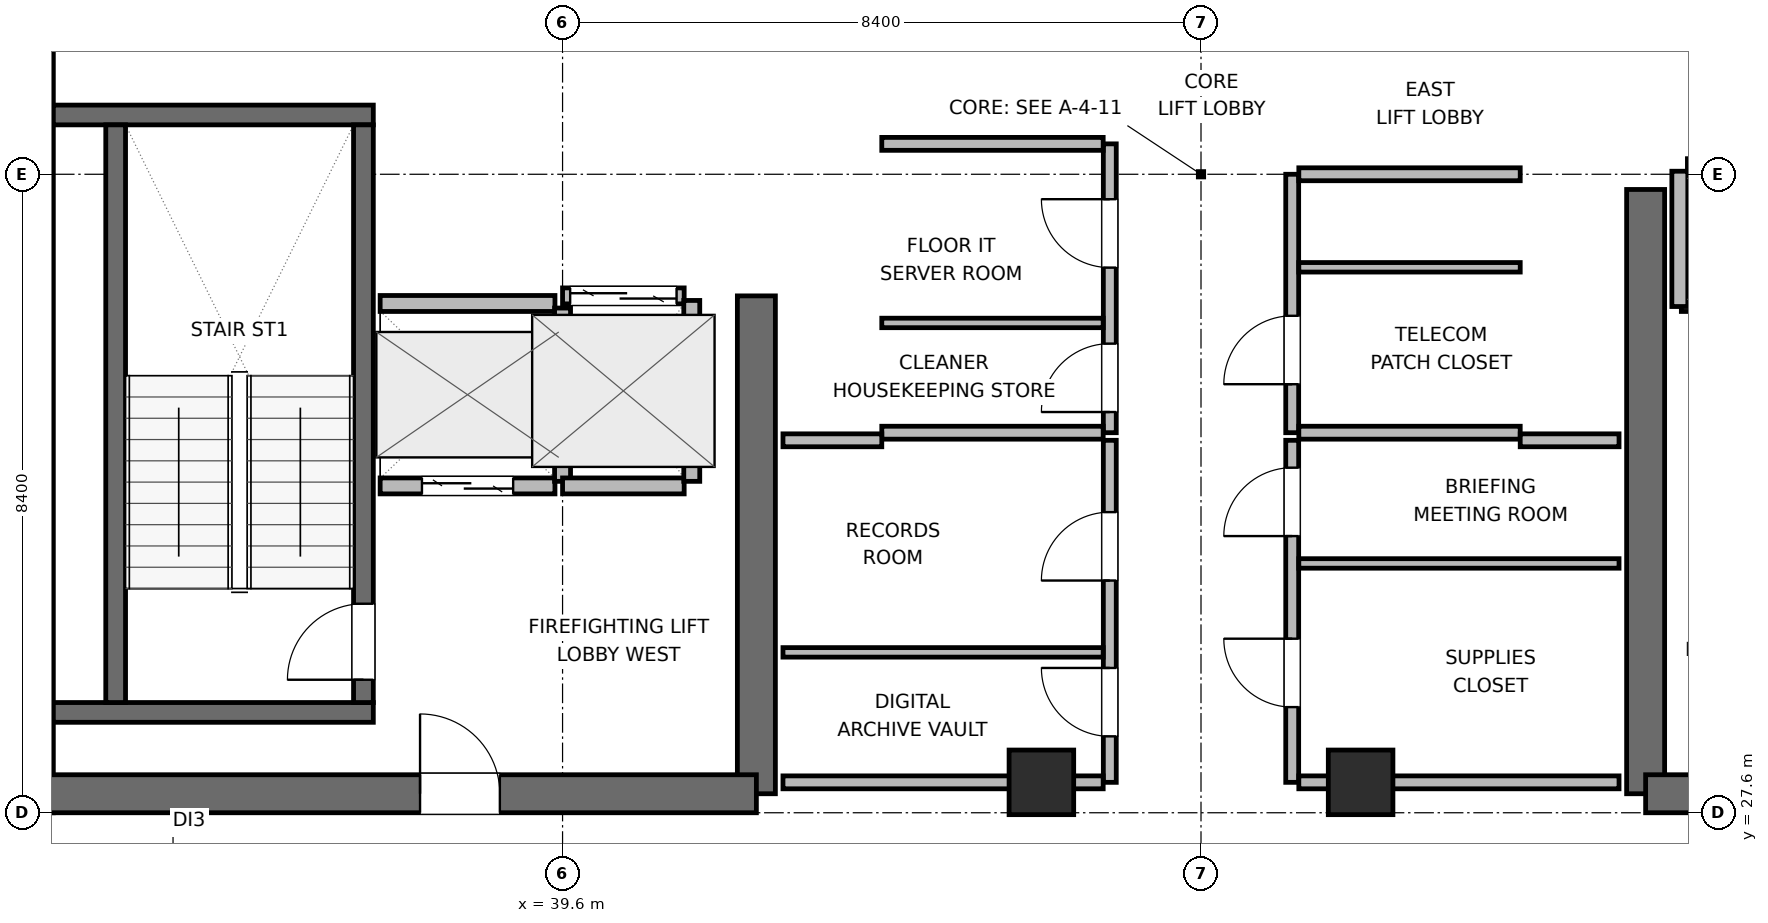
"""IFC4 building model, lengths in metres.
Left out: names, types, materials, properties, quantities, classifications, styles, units other than length and angle.
Written with IfcOpenShell. Run it as: python <this file> out.ifc"""

import sys

from ifc_helpers import new_model, si_unit, direction, frame, frame_2d, origin, origin_2d, place, context, subcontext, project, spatial, rectangle, extrude, element, fill, save


model = new_model("IFC4")
c1 = context("Model", 3, precision=1e-05, world=origin(), true_north=direction((0.0, 1.0)))
c2 = subcontext(c1, "Body", "Model", "MODEL_VIEW")
j1 = project(units=[si_unit("LENGTHUNIT", "METRE"), si_unit("PLANEANGLEUNIT", "RADIAN")], contexts=[c1])
p1 = place(None, origin())
s1 = spatial("IfcSite", under=j1, at=p1, CompositionType="ELEMENT")
p2 = place(p1, origin())
s2 = spatial("IfcBuilding", under=s1, at=p2, CompositionType="ELEMENT")
p3 = place(p2, frame((0.0, 0.0, 325.8)))
s3 = spatial("IfcBuildingStorey", under=s2, at=p3, CompositionType="ELEMENT", Elevation=325.8)
p4 = place(p3, frame((32.65, 27.6, 0.0), z_axis=(0.0, 0.0, 1.0), x_axis=(0.0, 1.0, 0.0)))
e1 = element("IfcWall", 1, at=p4, inside=s3, PredefinedType="SHEAR", context=c2, shape_type="SweptSolid", body=[
    extrude(rectangle(XDim=16.8, YDim=0.5, at=frame_2d((8.4, 0.0))), origin(), (0.0, 0.0, 1.0), 3.9),
])
p5 = place(p3, frame((42.15, 27.85, 0.0), z_axis=(0.0, 0.0, 1.0), x_axis=(0.0, 1.0, 0.0)))
e2 = element("IfcWall", 2, at=p5, inside=s3, PredefinedType="SHEAR", context=c2, shape_type="SweptSolid", body=[
    extrude(rectangle(XDim=6.55, YDim=0.5, at=frame_2d((3.275, 0.0))), origin(), (0.0, 0.0, 1.0), 3.9),
])
p6 = place(p3, frame((32.65, 27.85, 0.0), z_axis=(0.0, 0.0, 1.0), x_axis=(1.0, 0.0, 0.0)))
e3 = element("IfcWall", 3, at=p6, inside=s3, PredefinedType="SHEAR", context=c2, shape_type="SweptSolid", body=[
    extrude(rectangle(XDim=9.5, YDim=0.5, at=frame_2d((4.75, 0.0))), origin(), (0.0, 0.0, 1.0), 3.9),
])
p7 = place(p6, frame((5.075, 0.0, 0.0)))
e4 = element("IfcOpeningElement", 4, at=p7, cuts=e3, PredefinedType="OPENING", context=c2, shape_type="SweptSolid", body=[
    extrude(rectangle(XDim=1.05, YDim=2.04, at=frame_2d((0.525, 1.02))), frame((0.0, 0.26, 0.0), z_axis=(0.0, -1.0, 0.0), x_axis=(1.0, 0.0, 0.0)), (0.0, 0.0, 1.0), 0.52),
])
p8 = place(p3, frame((53.85, 27.85, 0.0), z_axis=(0.0, 0.0, 1.0), x_axis=(0.0, 1.0, 0.0)))
e5 = element("IfcWall", 5, at=p8, inside=s3, PredefinedType="SHEAR", context=c2, shape_type="SweptSolid", body=[
    extrude(rectangle(XDim=7.95, YDim=0.5, at=frame_2d((3.975, 0.0))), origin(), (0.0, 0.0, 1.0), 3.9),
])
p9 = place(p3, frame((53.85, 27.85, 0.0), z_axis=(0.0, 0.0, 1.0), x_axis=(1.0, 0.0, 0.0)))
e6 = element("IfcWall", 6, at=p9, inside=s3, PredefinedType="SHEAR", context=c2, shape_type="SweptSolid", body=[
    extrude(rectangle(XDim=9.5, YDim=0.5, at=frame_2d((4.75, 0.0))), origin(), (0.0, 0.0, 1.0), 3.9),
])
p10 = place(p9, frame((4.025, 0.0, 0.0)))
e7 = element("IfcOpeningElement", 7, at=p10, cuts=e6, PredefinedType="OPENING", context=c2, shape_type="SweptSolid", body=[
    extrude(rectangle(XDim=1.05, YDim=2.04, at=frame_2d((0.525, 1.02))), frame((0.0, 0.26, 0.0), z_axis=(0.0, -1.0, 0.0), x_axis=(1.0, 0.0, 0.0)), (0.0, 0.0, 1.0), 0.52),
])
for number, where, z_axis, x_axis in (
    (8, (32.9, 28.92, 0.0), (0.0, 0.0, 1.0), (1.0, 0.0, 0.0)),
    (9, (32.9, 36.78, 0.0), (0.0, 0.0, 1.0), (1.0, 0.0, 0.0)),
):
    element("IfcWall", number, at=place(p3, frame(where, z_axis=z_axis, x_axis=x_axis)), inside=s3, PredefinedType="SHEAR", context=c2, shape_type="SweptSolid", body=[
        extrude(rectangle(XDim=4.21, YDim=0.26, at=frame_2d((2.105, 0.0))), origin(), (0.0, 0.0, 1.0), 3.9),
    ])
p11 = place(p3, frame((33.72, 29.05, 0.0), z_axis=(0.0, 0.0, 1.0), x_axis=(0.0, 1.0, 0.0)))
e10 = element("IfcWall", 10, at=p11, inside=s3, PredefinedType="SHEAR", context=c2, shape_type="SweptSolid", body=[
    extrude(rectangle(XDim=7.6, YDim=0.26, at=frame_2d((3.8, 0.0))), origin(), (0.0, 0.0, 1.0), 3.9),
])
p12 = place(p3, frame((36.98, 29.05, 0.0), z_axis=(0.0, 0.0, 1.0), x_axis=(0.0, 1.0, 0.0)))
e11 = element("IfcWall", 11, at=p12, inside=s3, PredefinedType="SHEAR", context=c2, shape_type="SweptSolid", body=[
    extrude(rectangle(XDim=7.6, YDim=0.26, at=frame_2d((3.8, 0.0))), origin(), (0.0, 0.0, 1.0), 3.9),
])
p13 = place(p12, frame((0.3, 0.0, 0.0)))
e12 = element("IfcOpeningElement", 12, at=p13, cuts=e11, PredefinedType="OPENING", context=c2, shape_type="SweptSolid", body=[
    extrude(rectangle(XDim=1.0, YDim=2.04, at=frame_2d((0.5, 1.02))), frame((0.0, 0.14, 0.0), z_axis=(0.0, -1.0, 0.0), x_axis=(1.0, 0.0, 0.0)), (0.0, 0.0, 1.0), 0.28),
])
for number, where, z_axis, x_axis in (
    (13, (45.9, 28.0, 0.0), (0.0, 0.0, 1.0), (1.0, 0.0, 0.0)),
    (14, (50.1, 28.0, 0.0), (0.0, 0.0, 1.0), (1.0, 0.0, 0.0)),
):
    element("IfcColumn", number, at=place(p3, frame(where, z_axis=z_axis, x_axis=x_axis)), inside=s3, PredefinedType="COLUMN", context=c2, shape_type="SweptSolid", body=[
        extrude(rectangle(XDim=0.85, YDim=0.85, at=origin_2d()), origin(), (0.0, 0.0, 1.0), 3.9),
    ])
p14 = place(p3, frame((37.2, 31.9, 0.0), z_axis=(0.0, 0.0, 1.0), x_axis=(1.0, 0.0, 0.0)))
e15 = element("IfcWall", 15, at=p14, inside=s3, PredefinedType="PARTITIONING", context=c2, shape_type="SweptSolid", body=[
    extrude(rectangle(XDim=2.3, YDim=0.21, at=frame_2d((1.15, 0.0))), origin(), (0.0, 0.0, 1.0), 3.68),
])
p15 = place(p14, frame((0.55, 0.0, 0.0)))
e16 = element("IfcOpeningElement", 16, at=p15, cuts=e15, PredefinedType="OPENING", context=c2, shape_type="SweptSolid", body=[
    extrude(rectangle(XDim=1.2, YDim=2.04, at=frame_2d((0.6, 1.02))), frame((0.0, 0.115, 0.0), z_axis=(0.0, -1.0, 0.0), x_axis=(1.0, 0.0, 0.0)), (0.0, 0.0, 1.0), 0.23),
])
p16 = place(p3, frame((37.2, 34.3, 0.0), z_axis=(0.0, 0.0, 1.0), x_axis=(1.0, 0.0, 0.0)))
e17 = element("IfcWall", 17, at=p16, inside=s3, PredefinedType="PARTITIONING", context=c2, shape_type="SweptSolid", body=[
    extrude(rectangle(XDim=2.3, YDim=0.21, at=frame_2d((1.15, 0.0))), origin(), (0.0, 0.0, 1.0), 3.68),
])
p17 = place(p3, frame((39.6, 31.96, 0.0), z_axis=(0.0, 0.0, 1.0), x_axis=(0.0, 1.0, 0.0)))
e18 = element("IfcWall", 18, at=p17, inside=s3, PredefinedType="PARTITIONING", context=c2, shape_type="SweptSolid", body=[
    extrude(rectangle(XDim=2.28, YDim=0.21, at=frame_2d((1.14, 0.0))), origin(), (0.0, 0.0, 1.0), 3.68),
])
p18 = place(p3, frame((54.32, 34.3, 0.0), z_axis=(0.0, 0.0, 1.0), x_axis=(1.0, 0.0, 0.0)))
e19 = element("IfcWall", 19, at=p18, inside=s3, PredefinedType="PARTITIONING", context=c2, shape_type="SweptSolid", body=[
    extrude(rectangle(XDim=3.48, YDim=0.21, at=frame_2d((1.74, 0.0))), origin(), (0.0, 0.0, 1.0), 3.68),
])
p19 = place(p3, frame((39.6, 34.4, 0.0), z_axis=(0.0, 0.0, 1.0), x_axis=(1.0, 0.0, 0.0)))
e20 = element("IfcWall", 20, at=p19, inside=s3, PredefinedType="PARTITIONING", context=c2, shape_type="SweptSolid", body=[
    extrude(rectangle(XDim=1.6, YDim=0.21, at=frame_2d((0.8, 0.0))), origin(), (0.0, 0.0, 1.0), 3.68),
])
p20 = place(p19, frame((0.1, 0.0, 0.0)))
e21 = element("IfcOpeningElement", 21, at=p20, cuts=e20, PredefinedType="OPENING", context=c2, shape_type="SweptSolid", body=[
    extrude(rectangle(XDim=1.4, YDim=2.06, at=frame_2d((0.7, 1.03))), frame((0.0, 0.115, 0.0), z_axis=(0.0, -1.0, 0.0), x_axis=(1.0, 0.0, 0.0)), (0.0, 0.0, 1.0), 0.23),
])
p21 = place(p3, frame((39.6, 31.9, 0.0), z_axis=(0.0, 0.0, 1.0), x_axis=(1.0, 0.0, 0.0)))
e22 = element("IfcWall", 22, at=p21, inside=s3, PredefinedType="PARTITIONING", context=c2, shape_type="SweptSolid", body=[
    extrude(rectangle(XDim=1.6, YDim=0.21, at=frame_2d((0.8, 0.0))), origin(), (0.0, 0.0, 1.0), 3.68),
])
p22 = place(p3, frame((41.3, 31.96, 0.0), z_axis=(0.0, 0.0, 1.0), x_axis=(0.0, 1.0, 0.0)))
e23 = element("IfcWall", 23, at=p22, inside=s3, PredefinedType="PARTITIONING", context=c2, shape_type="SweptSolid", body=[
    extrude(rectangle(XDim=2.38, YDim=0.21, at=frame_2d((1.19, 0.0))), origin(), (0.0, 0.0, 1.0), 3.68),
])
p23 = place(p3, frame((54.4, 36.1, 0.0), z_axis=(0.0, 0.0, 1.0), x_axis=(1.0, 0.0, 0.0)))
e24 = element("IfcWall", 24, at=p23, inside=s3, PredefinedType="PARTITIONING", context=c2, shape_type="SweptSolid", body=[
    extrude(rectangle(XDim=2.1, YDim=0.21, at=frame_2d((1.05, 0.0))), origin(), (0.0, 0.0, 1.0), 3.68),
])
p24 = place(p23, frame((0.5, 0.0, 0.0)))
e25 = element("IfcOpeningElement", 25, at=p24, cuts=e24, PredefinedType="OPENING", context=c2, shape_type="SweptSolid", body=[
    extrude(rectangle(XDim=1.1, YDim=2.04, at=frame_2d((0.55, 1.02))), frame((0.0, 0.115, 0.0), z_axis=(0.0, -1.0, 0.0), x_axis=(1.0, 0.0, 0.0)), (0.0, 0.0, 1.0), 0.23),
])
p25 = place(p3, frame((54.3, 34.26, 0.0), z_axis=(0.0, 0.0, 1.0), x_axis=(0.0, 1.0, 0.0)))
e26 = element("IfcWall", 26, at=p25, inside=s3, PredefinedType="PARTITIONING", context=c2, shape_type="SweptSolid", body=[
    extrude(rectangle(XDim=1.78, YDim=0.21, at=frame_2d((0.89, 0.0))), origin(), (0.0, 0.0, 1.0), 3.68),
])
p26 = place(p3, frame((46.8, 32.6, 0.0), z_axis=(0.0, 0.0, 1.0), x_axis=(0.0, 1.0, 0.0)))
e27 = element("IfcWall", 27, at=p26, inside=s3, PredefinedType="PARTITIONING", context=c2, shape_type="SweptSolid", body=[
    extrude(rectangle(XDim=3.8, YDim=0.17, at=frame_2d((1.9, 0.0))), origin(), (0.0, 0.0, 1.0), 3.68),
])
p27 = place(p26, frame((0.272, 0.0, 0.0)))
e28 = element("IfcOpeningElement", 28, at=p27, cuts=e27, PredefinedType="OPENING", context=c2, shape_type="SweptSolid", body=[
    extrude(rectangle(XDim=0.9, YDim=2.02, at=frame_2d((0.45, 1.01))), frame((0.0, 0.095, 0.0), z_axis=(0.0, -1.0, 0.0), x_axis=(1.0, 0.0, 0.0)), (0.0, 0.0, 1.0), 0.19),
])
p28 = place(p26, frame((2.172, 0.0, 0.0)))
e29 = element("IfcOpeningElement", 29, at=p28, cuts=e27, PredefinedType="OPENING", context=c2, shape_type="SweptSolid", body=[
    extrude(rectangle(XDim=0.9, YDim=2.02, at=frame_2d((0.45, 1.01))), frame((0.0, 0.095, 0.0), z_axis=(0.0, -1.0, 0.0), x_axis=(1.0, 0.0, 0.0)), (0.0, 0.0, 1.0), 0.19),
])
for number, where, z_axis, x_axis in (
    (30, (43.8, 32.6, 0.0), (0.0, 0.0, 1.0), (1.0, 0.0, 0.0)),
    (31, (43.8, 36.4, 0.0), (0.0, 0.0, 1.0), (1.0, 0.0, 0.0)),
):
    element("IfcWall", number, at=place(p3, frame(where, z_axis=z_axis, x_axis=x_axis)), inside=s3, PredefinedType="PARTITIONING", context=c2, shape_type="SweptSolid", body=[
        extrude(rectangle(XDim=2.913, YDim=0.17, at=frame_2d((1.457, 0.0))), origin(), (0.0, 0.0, 1.0), 3.68),
    ])
p29 = place(p3, frame((43.8, 34.044, 0.0), z_axis=(0.0, 0.0, 1.0), x_axis=(1.0, 0.0, 0.0)))
e32 = element("IfcWall", 32, at=p29, inside=s3, PredefinedType="PARTITIONING", context=c2, shape_type="SweptSolid", body=[
    extrude(rectangle(XDim=2.913, YDim=0.125, at=frame_2d((1.457, 0.0))), origin(), (0.0, 0.0, 1.0), 3.68),
])
p30 = place(p3, frame((49.2, 32.6, 0.0), z_axis=(0.0, 0.0, 1.0), x_axis=(0.0, 1.0, 0.0)))
e33 = element("IfcWall", 33, at=p30, inside=s3, PredefinedType="PARTITIONING", context=c2, shape_type="SweptSolid", body=[
    extrude(rectangle(XDim=3.4, YDim=0.17, at=frame_2d((1.7, 0.0))), origin(), (0.0, 0.0, 1.0), 3.68),
])
p31 = place(p30, frame((0.638, 0.0, 0.0)))
e34 = element("IfcOpeningElement", 34, at=p31, cuts=e33, PredefinedType="OPENING", context=c2, shape_type="SweptSolid", body=[
    extrude(rectangle(XDim=0.9, YDim=2.02, at=frame_2d((0.45, 1.01))), frame((0.0, 0.095, 0.0), z_axis=(0.0, -1.0, 0.0), x_axis=(1.0, 0.0, 0.0)), (0.0, 0.0, 1.0), 0.19),
])
for number, where, z_axis, x_axis in (
    (35, (49.287, 32.6, 0.0), (0.0, 0.0, 1.0), (1.0, 0.0, 0.0)),
    (36, (49.287, 36.0, 0.0), (0.0, 0.0, 1.0), (1.0, 0.0, 0.0)),
):
    element("IfcWall", number, at=place(p3, frame(where, z_axis=z_axis, x_axis=x_axis)), inside=s3, PredefinedType="PARTITIONING", context=c2, shape_type="SweptSolid", body=[
        extrude(rectangle(XDim=2.913, YDim=0.17, at=frame_2d((1.457, 0.0))), origin(), (0.0, 0.0, 1.0), 3.68),
    ])
p32 = place(p3, frame((49.287, 34.776, 0.0), z_axis=(0.0, 0.0, 1.0), x_axis=(1.0, 0.0, 0.0)))
e37 = element("IfcWall", 37, at=p32, inside=s3, PredefinedType="PARTITIONING", context=c2, shape_type="SweptSolid", body=[
    extrude(rectangle(XDim=2.913, YDim=0.125, at=frame_2d((1.457, 0.0))), origin(), (0.0, 0.0, 1.0), 3.68),
])
p33 = place(p3, frame((46.8, 28.0, 0.0), z_axis=(0.0, 0.0, 1.0), x_axis=(0.0, 1.0, 0.0)))
e38 = element("IfcWall", 38, at=p33, inside=s3, PredefinedType="PARTITIONING", context=c2, shape_type="SweptSolid", body=[
    extrude(rectangle(XDim=4.5, YDim=0.17, at=frame_2d((2.25, 0.0))), origin(), (0.0, 0.0, 1.0), 3.68),
])
p34 = place(p33, frame((0.605, 0.0, 0.0)))
e39 = element("IfcOpeningElement", 39, at=p34, cuts=e38, PredefinedType="OPENING", context=c2, shape_type="SweptSolid", body=[
    extrude(rectangle(XDim=0.9, YDim=2.02, at=frame_2d((0.45, 1.01))), frame((0.0, 0.095, 0.0), z_axis=(0.0, -1.0, 0.0), x_axis=(1.0, 0.0, 0.0)), (0.0, 0.0, 1.0), 0.19),
])
p35 = place(p33, frame((2.655, 0.0, 0.0)))
e40 = element("IfcOpeningElement", 40, at=p35, cuts=e38, PredefinedType="OPENING", context=c2, shape_type="SweptSolid", body=[
    extrude(rectangle(XDim=0.9, YDim=2.02, at=frame_2d((0.45, 1.01))), frame((0.0, 0.095, 0.0), z_axis=(0.0, -1.0, 0.0), x_axis=(1.0, 0.0, 0.0)), (0.0, 0.0, 1.0), 0.19),
])
p36 = place(p3, frame((42.5, 28.0, 0.0), z_axis=(0.0, 0.0, 1.0), x_axis=(1.0, 0.0, 0.0)))
e41 = element("IfcWall", 41, at=p36, inside=s3, PredefinedType="PARTITIONING", context=c2, shape_type="SweptSolid", body=[
    extrude(rectangle(XDim=4.213, YDim=0.17, at=frame_2d((2.106, 0.0))), origin(), (0.0, 0.0, 1.0), 2.765),
])
p37 = place(p3, frame((42.5, 32.5, 0.0), z_axis=(0.0, 0.0, 1.0), x_axis=(1.0, 0.0, 0.0)))
e42 = element("IfcWall", 42, at=p37, inside=s3, PredefinedType="PARTITIONING", context=c2, shape_type="SweptSolid", body=[
    extrude(rectangle(XDim=1.3, YDim=0.17, at=frame_2d((0.65, 0.0))), origin(), (0.0, 0.0, 1.0), 3.68),
])
p38 = place(p3, frame((42.5, 29.71, 0.0), z_axis=(0.0, 0.0, 1.0), x_axis=(1.0, 0.0, 0.0)))
e43 = element("IfcWall", 43, at=p38, inside=s3, PredefinedType="PARTITIONING", context=c2, shape_type="SweptSolid", body=[
    extrude(rectangle(XDim=4.213, YDim=0.125, at=frame_2d((2.106, 0.0))), origin(), (0.0, 0.0, 1.0), 3.68),
])
p39 = place(p3, frame((49.2, 28.0, 0.0), z_axis=(0.0, 0.0, 1.0), x_axis=(0.0, 1.0, 0.0)))
e44 = element("IfcWall", 44, at=p39, inside=s3, PredefinedType="PARTITIONING", context=c2, shape_type="SweptSolid", body=[
    extrude(rectangle(XDim=4.5, YDim=0.17, at=frame_2d((2.25, 0.0))), origin(), (0.0, 0.0, 1.0), 3.68),
])
p40 = place(p39, frame((0.99, 0.0, 0.0)))
e45 = element("IfcOpeningElement", 45, at=p40, cuts=e44, PredefinedType="OPENING", context=c2, shape_type="SweptSolid", body=[
    extrude(rectangle(XDim=0.9, YDim=2.02, at=frame_2d((0.45, 1.01))), frame((0.0, 0.095, 0.0), z_axis=(0.0, -1.0, 0.0), x_axis=(1.0, 0.0, 0.0)), (0.0, 0.0, 1.0), 0.19),
])
p41 = place(p39, frame((3.24, 0.0, 0.0)))
e46 = element("IfcOpeningElement", 46, at=p41, cuts=e44, PredefinedType="OPENING", context=c2, shape_type="SweptSolid", body=[
    extrude(rectangle(XDim=0.9, YDim=2.02, at=frame_2d((0.45, 1.01))), frame((0.0, 0.095, 0.0), z_axis=(0.0, -1.0, 0.0), x_axis=(1.0, 0.0, 0.0)), (0.0, 0.0, 1.0), 0.19),
])
p42 = place(p3, frame((49.287, 28.0, 0.0), z_axis=(0.0, 0.0, 1.0), x_axis=(1.0, 0.0, 0.0)))
e47 = element("IfcWall", 47, at=p42, inside=s3, PredefinedType="PARTITIONING", context=c2, shape_type="SweptSolid", body=[
    extrude(rectangle(XDim=4.213, YDim=0.17, at=frame_2d((2.106, 0.0))), origin(), (0.0, 0.0, 1.0), 2.765),
])
p43 = place(p3, frame((52.2, 32.5, 0.0), z_axis=(0.0, 0.0, 1.0), x_axis=(1.0, 0.0, 0.0)))
e48 = element("IfcWall", 48, at=p43, inside=s3, PredefinedType="PARTITIONING", context=c2, shape_type="SweptSolid", body=[
    extrude(rectangle(XDim=1.3, YDim=0.17, at=frame_2d((0.65, 0.0))), origin(), (0.0, 0.0, 1.0), 3.68),
])
p44 = place(p3, frame((49.287, 30.88, 0.0), z_axis=(0.0, 0.0, 1.0), x_axis=(1.0, 0.0, 0.0)))
e49 = element("IfcWall", 49, at=p44, inside=s3, PredefinedType="PARTITIONING", context=c2, shape_type="SweptSolid", body=[
    extrude(rectangle(XDim=4.213, YDim=0.125, at=frame_2d((2.106, 0.0))), origin(), (0.0, 0.0, 1.0), 3.68),
])
p45 = place(p13, origin())
e50 = element("IfcDoor", 50, at=p45, inside=s3, OperationType="SINGLE_SWING_LEFT", PredefinedType="DOOR", context=c2, shape_type="SweptSolid", body=[
    extrude(rectangle(XDim=1.0, YDim=2.04, at=frame_2d((0.5, 1.02))), frame((0.0, 0.025, 0.0), z_axis=(0.0, -1.0, 0.0), x_axis=(1.0, 0.0, 0.0)), (0.0, 0.0, 1.0), 0.05),
])
fill(e12, e50)
p46 = place(p15, origin())
e51 = element("IfcDoor", 51, at=p46, inside=s3, OperationType="DOUBLE_DOOR_SLIDING", PredefinedType="DOOR", context=c2, shape_type="SweptSolid", body=[
    extrude(rectangle(XDim=1.2, YDim=2.04, at=frame_2d((0.6, 1.02))), frame((0.0, 0.025, 0.0), z_axis=(0.0, -1.0, 0.0), x_axis=(1.0, 0.0, 0.0)), (0.0, 0.0, 1.0), 0.05),
])
fill(e16, e51)
p47 = place(p20, origin())
e52 = element("IfcDoor", 52, at=p47, inside=s3, OperationType="DOUBLE_DOOR_SLIDING", PredefinedType="DOOR", context=c2, shape_type="SweptSolid", body=[
    extrude(rectangle(XDim=1.4, YDim=2.06, at=frame_2d((0.7, 1.03))), frame((0.0, 0.025, 0.0), z_axis=(0.0, -1.0, 0.0), x_axis=(1.0, 0.0, 0.0)), (0.0, 0.0, 1.0), 0.05),
])
fill(e21, e52)
p48 = place(p7, origin())
e53 = element("IfcDoor", 53, at=p48, inside=s3, OperationType="SINGLE_SWING_LEFT", PredefinedType="DOOR", context=c2, shape_type="SweptSolid", body=[
    extrude(rectangle(XDim=1.05, YDim=2.04, at=frame_2d((0.525, 1.02))), frame((0.0, 0.025, 0.0), z_axis=(0.0, -1.0, 0.0), x_axis=(1.0, 0.0, 0.0)), (0.0, 0.0, 1.0), 0.05),
])
fill(e4, e53)
p49 = place(p27, origin())
e54 = element("IfcDoor", 54, at=p49, inside=s3, OperationType="SINGLE_SWING_LEFT", PredefinedType="DOOR", context=c2, shape_type="SweptSolid", body=[
    extrude(rectangle(XDim=0.9, YDim=2.02, at=frame_2d((0.45, 1.01))), frame((0.0, 0.025, 0.0), z_axis=(0.0, -1.0, 0.0), x_axis=(1.0, 0.0, 0.0)), (0.0, 0.0, 1.0), 0.05),
])
fill(e28, e54)
p50 = place(p28, origin())
e55 = element("IfcDoor", 55, at=p50, inside=s3, OperationType="SINGLE_SWING_RIGHT", PredefinedType="DOOR", context=c2, shape_type="SweptSolid", body=[
    extrude(rectangle(XDim=0.9, YDim=2.02, at=frame_2d((0.45, 1.01))), frame((0.0, 0.025, 0.0), z_axis=(0.0, -1.0, 0.0), x_axis=(1.0, 0.0, 0.0)), (0.0, 0.0, 1.0), 0.05),
])
fill(e29, e55)
p51 = place(p31, origin())
e56 = element("IfcDoor", 56, at=p51, inside=s3, OperationType="SINGLE_SWING_LEFT", PredefinedType="DOOR", context=c2, shape_type="SweptSolid", body=[
    extrude(rectangle(XDim=0.9, YDim=2.02, at=frame_2d((0.45, 1.01))), frame((0.0, 0.025, 0.0), z_axis=(0.0, -1.0, 0.0), x_axis=(1.0, 0.0, 0.0)), (0.0, 0.0, 1.0), 0.05),
])
fill(e34, e56)
p52 = place(p34, origin())
e57 = element("IfcDoor", 57, at=p52, inside=s3, OperationType="SINGLE_SWING_RIGHT", PredefinedType="DOOR", context=c2, shape_type="SweptSolid", body=[
    extrude(rectangle(XDim=0.9, YDim=2.02, at=frame_2d((0.45, 1.01))), frame((0.0, 0.025, 0.0), z_axis=(0.0, -1.0, 0.0), x_axis=(1.0, 0.0, 0.0)), (0.0, 0.0, 1.0), 0.05),
])
fill(e39, e57)
p53 = place(p35, origin())
e58 = element("IfcDoor", 58, at=p53, inside=s3, OperationType="SINGLE_SWING_LEFT", PredefinedType="DOOR", context=c2, shape_type="SweptSolid", body=[
    extrude(rectangle(XDim=0.9, YDim=2.02, at=frame_2d((0.45, 1.01))), frame((0.0, 0.025, 0.0), z_axis=(0.0, -1.0, 0.0), x_axis=(1.0, 0.0, 0.0)), (0.0, 0.0, 1.0), 0.05),
])
fill(e40, e58)
p54 = place(p40, origin())
e59 = element("IfcDoor", 59, at=p54, inside=s3, OperationType="SINGLE_SWING_RIGHT", PredefinedType="DOOR", context=c2, shape_type="SweptSolid", body=[
    extrude(rectangle(XDim=0.9, YDim=2.02, at=frame_2d((0.45, 1.01))), frame((0.0, 0.025, 0.0), z_axis=(0.0, -1.0, 0.0), x_axis=(1.0, 0.0, 0.0)), (0.0, 0.0, 1.0), 0.05),
])
fill(e45, e59)
p55 = place(p41, origin())
e60 = element("IfcDoor", 60, at=p55, inside=s3, OperationType="SINGLE_SWING_LEFT", PredefinedType="DOOR", context=c2, shape_type="SweptSolid", body=[
    extrude(rectangle(XDim=0.9, YDim=2.02, at=frame_2d((0.45, 1.01))), frame((0.0, 0.025, 0.0), z_axis=(0.0, -1.0, 0.0), x_axis=(1.0, 0.0, 0.0)), (0.0, 0.0, 1.0), 0.05),
])
fill(e46, e60)
save(model, sys.argv[1])
